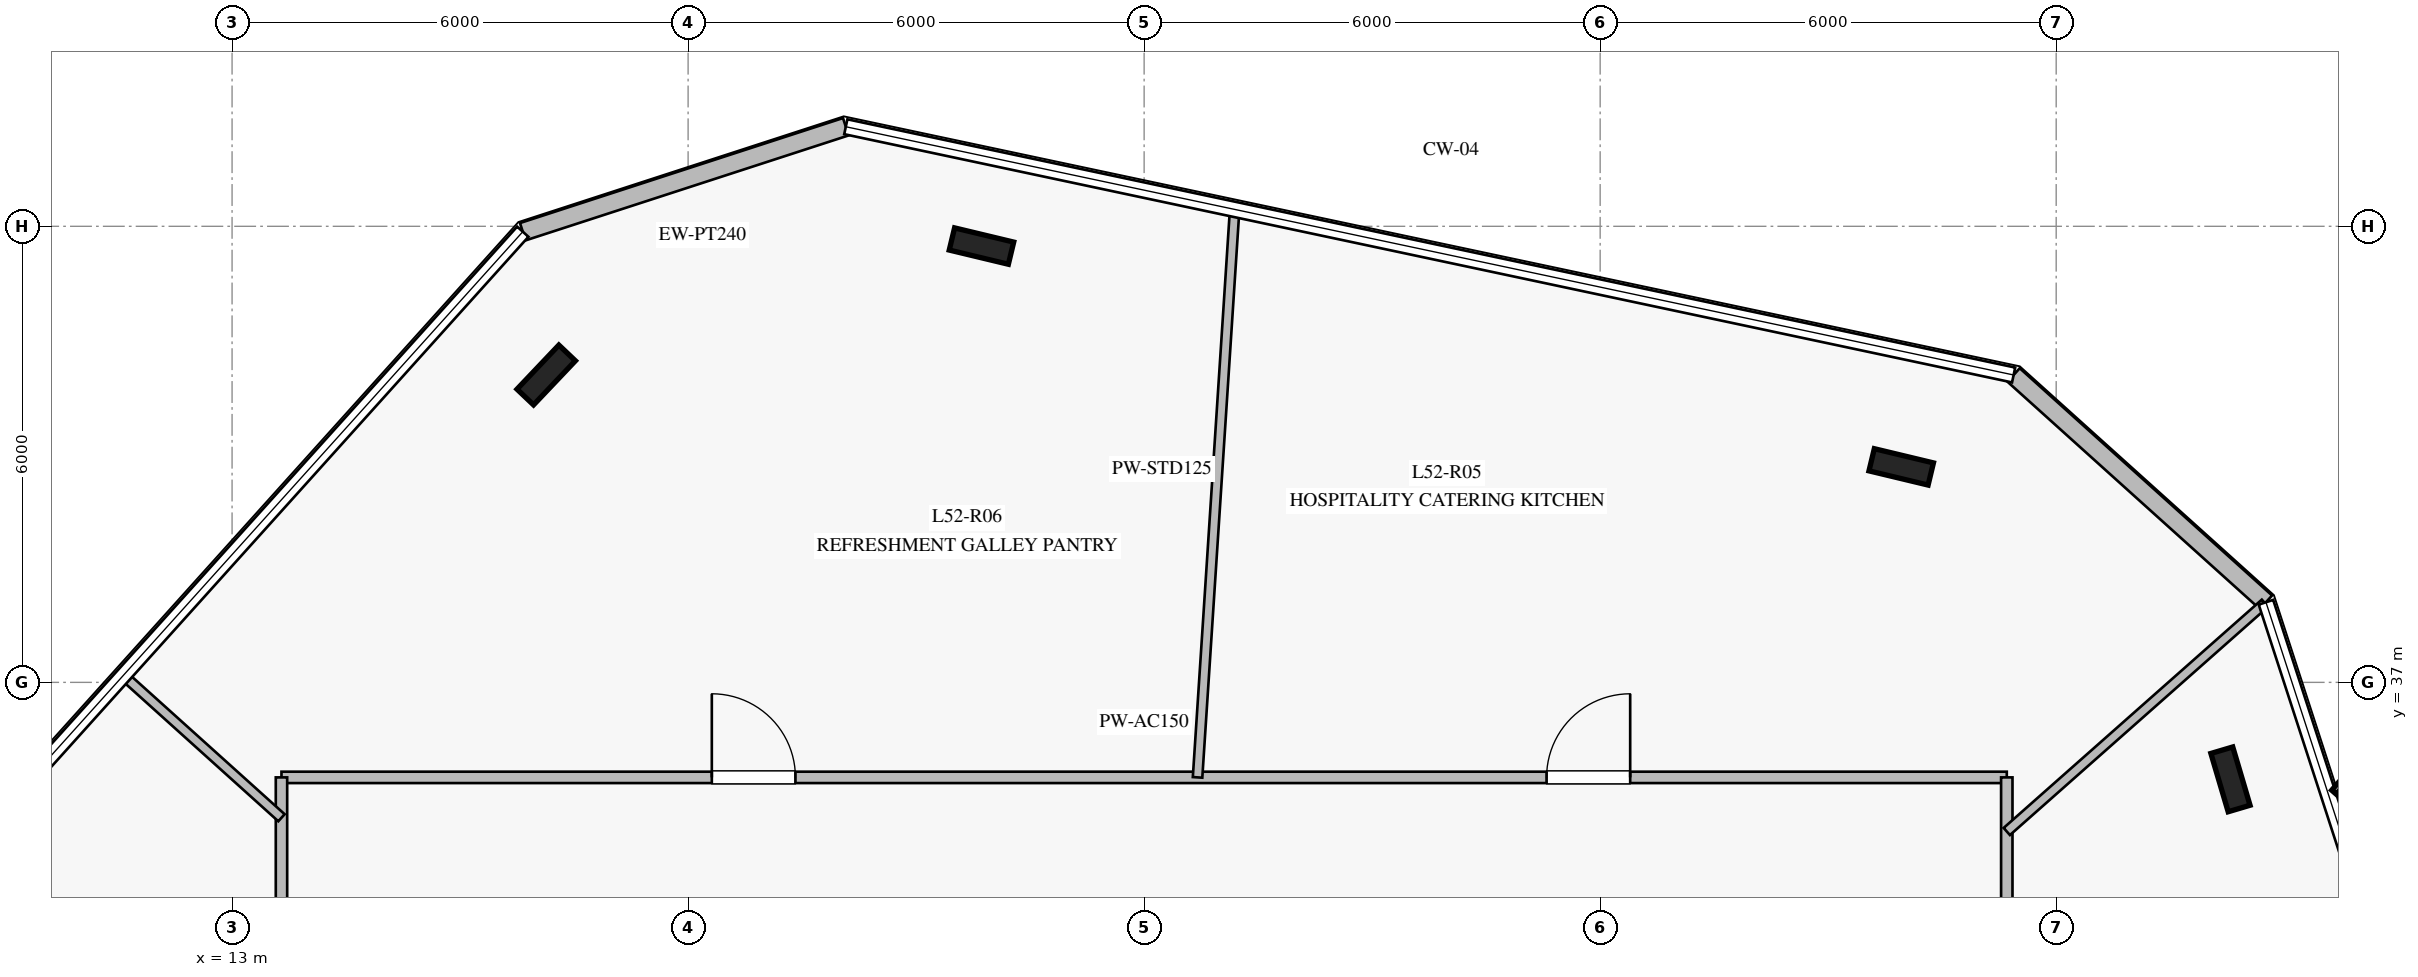
"""IFC4 building model, lengths in metres.
Left out: names, types, materials, properties, quantities, classifications, styles, units other than length and angle.
Written with IfcOpenShell. Run it as: python <this file> out.ifc"""

import sys

from ifc_helpers import new_model, si_unit, direction, frame, frame_2d, origin, origin_2d, place, context, subcontext, project, spatial, rectangle, i_section, extrude, element, fill, save


model = new_model("IFC4")
c1 = context("Model", 3, precision=1e-05, world=origin(), true_north=direction((0.0, 1.0)))
c2 = subcontext(c1, "Body", "Model", "MODEL_VIEW")
j1 = project(units=[si_unit("LENGTHUNIT", "METRE"), si_unit("PLANEANGLEUNIT", "RADIAN")], contexts=[c1])
p1 = place(None, origin())
s1 = spatial("IfcSite", under=j1, at=p1, CompositionType="ELEMENT")
p2 = place(p1, origin())
s2 = spatial("IfcBuilding", under=s1, at=p2, CompositionType="ELEMENT")
p3 = place(p2, frame((0.0, 0.0, 216.8)))
s3 = spatial("IfcBuildingStorey", under=s2, at=p3, CompositionType="ELEMENT", Elevation=216.8)
for number, where, z_axis, x_axis in (
    (1, (34.961, 39.835, 0.0), (0.0, 0.0, 1.0), (-0.972, 0.233, 0.0)),
    (2, (22.86, 42.74, 0.0), (0.0, 0.0, 1.0), (-0.972, 0.233, 0.0)),
    (3, (17.133, 41.044, 0.0), (0.0, 0.0, 1.0), (0.688, 0.725, 0.0)),
    (4, (39.293, 35.724, 0.0), (0.0, 0.0, 1.0), (-0.284, 0.959, 0.0)),
):
    element("IfcColumn", number, at=place(p3, frame(where, z_axis=z_axis, x_axis=x_axis)), inside=s3, PredefinedType="COLUMN", context=c2, shape_type="SweptSolid", body=[
        extrude(i_section(OverallWidth=0.3, OverallDepth=0.8, WebThickness=0.018, FlangeThickness=0.033, at=origin_2d()), origin(), (0.0, 0.0, 1.0), 4.0),
    ])
p4 = place(p3, frame((21.075, 44.31, 0.0), z_axis=(0.0, 0.0, 1.0), x_axis=(-0.95104370386, -0.309056424215, 0.0)))
e5 = element("IfcWall", 5, at=p4, inside=s3, PredefinedType="STANDARD", context=c2, shape_type="SweptSolid", body=[
    extrude(rectangle(XDim=4.469, YDim=0.24, at=frame_2d((2.234, 0.0))), origin(), (0.0, 0.0, 1.0), 3.78),
])
p5 = place(p3, frame((39.76, 38.054, 0.0), z_axis=(0.0, 0.0, 1.0), x_axis=(-0.74307946371, 0.669203190827, 0.0)))
e6 = element("IfcWall", 6, at=p5, inside=s3, PredefinedType="STANDARD", context=c2, shape_type="SweptSolid", body=[
    extrude(rectangle(XDim=4.468, YDim=0.24, at=frame_2d((2.234, 0.0))), origin(), (0.0, 0.0, 1.0), 3.78),
])
p6 = place(p3, frame((13.65, 35.75, 0.0), z_axis=(0.0, 0.0, 1.0), x_axis=(1.0, 0.0, 0.0)))
e7 = element("IfcWall", 7, at=p6, inside=s3, PredefinedType="PARTITIONING", context=c2, shape_type="SweptSolid", body=[
    extrude(rectangle(XDim=22.7, YDim=0.15, at=frame_2d((11.35, 0.0))), origin(), (0.0, 0.0, 1.0), 3.05),
])
p7 = place(p6, frame((16.645, 0.0, 0.0)))
e8 = element("IfcOpeningElement", 8, at=p7, cuts=e7, PredefinedType="OPENING", context=c2, shape_type="SweptSolid", body=[
    extrude(rectangle(XDim=1.1, YDim=2.2, at=frame_2d((0.55, 1.1))), frame((0.0, 0.085, 0.0), z_axis=(0.0, -1.0, 0.0), x_axis=(1.0, 0.0, 0.0)), (0.0, 0.0, 1.0), 0.17),
])
p8 = place(p6, frame((5.662, 0.0, 0.0)))
e9 = element("IfcOpeningElement", 9, at=p8, cuts=e7, PredefinedType="OPENING", context=c2, shape_type="SweptSolid", body=[
    extrude(rectangle(XDim=1.1, YDim=2.2, at=frame_2d((0.55, 1.1))), frame((0.0, 0.085, 0.0), z_axis=(0.0, -1.0, 0.0), x_axis=(1.0, 0.0, 0.0)), (0.0, 0.0, 1.0), 0.17),
])
p9 = place(p3, frame((36.35, 35.75, 0.0), z_axis=(0.0, 0.0, 1.0), x_axis=(0.0, -1.0, 0.0)))
e10 = element("IfcWall", 10, at=p9, inside=s3, PredefinedType="PARTITIONING", context=c2, shape_type="SweptSolid", body=[
    extrude(rectangle(XDim=21.5, YDim=0.15, at=frame_2d((10.75, 0.0))), origin(), (0.0, 0.0, 1.0), 3.28),
])
p10 = place(p9, frame((15.94, 0.0, 0.0)))
e11 = element("IfcOpeningElement", 11, at=p10, cuts=e10, PredefinedType="OPENING", context=c2, shape_type="SweptSolid", body=[
    extrude(rectangle(XDim=1.1, YDim=2.2, at=frame_2d((0.55, 1.1))), frame((0.0, 0.085, 0.0), z_axis=(0.0, -1.0, 0.0), x_axis=(1.0, 0.0, 0.0)), (0.0, 0.0, 1.0), 0.17),
])
p11 = place(p9, frame((5.6, 0.0, 0.0)))
e12 = element("IfcOpeningElement", 12, at=p11, cuts=e10, PredefinedType="OPENING", context=c2, shape_type="SweptSolid", body=[
    extrude(rectangle(XDim=1.1, YDim=2.2, at=frame_2d((0.55, 1.1))), frame((0.0, 0.085, 0.0), z_axis=(0.0, -1.0, 0.0), x_axis=(1.0, 0.0, 0.0)), (0.0, 0.0, 1.0), 0.17),
])
p12 = place(p3, frame((13.65, 14.25, 0.0), z_axis=(0.0, 0.0, 1.0), x_axis=(0.0, 1.0, 0.0)))
e13 = element("IfcWall", 13, at=p12, inside=s3, PredefinedType="PARTITIONING", context=c2, shape_type="SweptSolid", body=[
    extrude(rectangle(XDim=21.5, YDim=0.15, at=frame_2d((10.75, 0.0))), origin(), (0.0, 0.0, 1.0), 3.28),
])
p13 = place(p12, frame((14.282, 0.0, 0.0)))
e14 = element("IfcOpeningElement", 14, at=p13, cuts=e13, PredefinedType="OPENING", context=c2, shape_type="SweptSolid", body=[
    extrude(rectangle(XDim=1.1, YDim=2.2, at=frame_2d((0.55, 1.1))), frame((0.0, 0.085, 0.0), z_axis=(0.0, -1.0, 0.0), x_axis=(1.0, 0.0, 0.0)), (0.0, 0.0, 1.0), 0.17),
])
p14 = place(p3, frame((25.703, 35.75, 0.0), z_axis=(0.0, 0.0, 1.0), x_axis=(0.065185232358, 0.997873181062, 0.0)))
e15 = element("IfcWall", 15, at=p14, inside=s3, PredefinedType="PARTITIONING", context=c2, shape_type="SweptSolid", body=[
    extrude(rectangle(XDim=7.472, YDim=0.125, at=frame_2d((3.736, 0.0))), origin(), (0.0, 0.0, 1.0), 3.05),
])
p15 = place(p3, frame((13.65, 35.219, 0.0), z_axis=(0.0, 0.0, 1.0), x_axis=(-0.743119619427, 0.669158599453, 0.0)))
e16 = element("IfcWall", 16, at=p15, inside=s3, PredefinedType="PARTITIONING", context=c2, shape_type="SweptSolid", body=[
    extrude(rectangle(XDim=2.783, YDim=0.125, at=frame_2d((1.391, 0.0))), origin(), (0.0, 0.0, 1.0), 3.18),
])
p16 = place(p3, frame((36.35, 35.038, 0.0), z_axis=(0.0, 0.0, 1.0), x_axis=(0.749117810884, 0.662436793526, 0.0)))
e17 = element("IfcWall", 17, at=p16, inside=s3, PredefinedType="PARTITIONING", context=c2, shape_type="SweptSolid", body=[
    extrude(rectangle(XDim=4.535, YDim=0.125, at=frame_2d((2.267, 0.0))), origin(), (0.0, 0.0, 1.0), 3.18),
])
p17 = place(p7, origin())
e18 = element("IfcDoor", 18, at=p17, inside=s3, OperationType="SINGLE_SWING_RIGHT", PredefinedType="DOOR", context=c2, shape_type="SweptSolid", body=[
    extrude(rectangle(XDim=1.1, YDim=2.2, at=frame_2d((0.55, 1.1))), frame((0.0, 0.025, 0.0), z_axis=(0.0, -1.0, 0.0), x_axis=(1.0, 0.0, 0.0)), (0.0, 0.0, 1.0), 0.05),
])
fill(e8, e18)
p18 = place(p8, origin())
e19 = element("IfcDoor", 19, at=p18, inside=s3, OperationType="SINGLE_SWING_LEFT", PredefinedType="DOOR", context=c2, shape_type="SweptSolid", body=[
    extrude(rectangle(XDim=1.1, YDim=2.2, at=frame_2d((0.55, 1.1))), frame((0.0, 0.025, 0.0), z_axis=(0.0, -1.0, 0.0), x_axis=(1.0, 0.0, 0.0)), (0.0, 0.0, 1.0), 0.05),
])
fill(e9, e19)
save(model, sys.argv[1])
